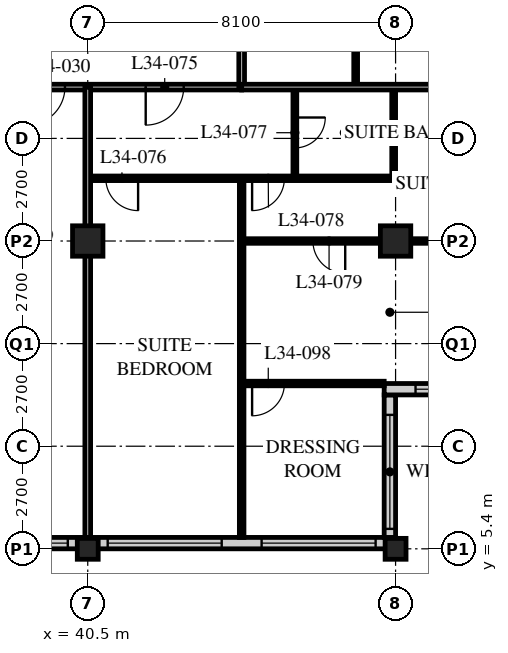
"""IFC4 building model, lengths in metres.
Left out: names, types, materials, properties, quantities, classifications, styles, units other than length and angle.
Written with IfcOpenShell. Run it as: python <this file> out.ifc"""

import sys

from ifc_helpers import new_model, si_unit, direction, frame, frame_2d, origin, origin_2d, place, context, subcontext, project, spatial, rectangle, hollow_rectangle, extrude, element, fill, save


model = new_model("IFC4")
c1 = context("Model", 3, precision=1e-05, world=origin(), true_north=direction((0.0, 1.0)))
c2 = subcontext(c1, "Body", "Model", "MODEL_VIEW")
j1 = project(units=[si_unit("LENGTHUNIT", "METRE"), si_unit("PLANEANGLEUNIT", "RADIAN")], contexts=[c1])
p1 = place(None, origin())
s1 = spatial("IfcSite", under=j1, at=p1, CompositionType="ELEMENT")
p2 = place(p1, origin())
s2 = spatial("IfcBuilding", under=s1, at=p2, CompositionType="ELEMENT")
p3 = place(p2, frame((0.0, 0.0, 134.0)))
s3 = spatial("IfcBuildingStorey", under=s2, at=p3, CompositionType="ELEMENT", Elevation=134.0)
p4 = place(p3, frame((40.5, 5.4, 0.0), z_axis=(0.0, 0.0, 1.0), x_axis=(1.0, 0.0, 0.0)))
e1 = element("IfcColumn", 1, at=p4, inside=s3, PredefinedType="COLUMN", context=c2, shape_type="SweptSolid", body=[
    extrude(hollow_rectangle(XDim=0.55, YDim=0.55, WallThickness=0.04, at=origin_2d()), origin(), (0.0, 0.0, 1.0), 3.4),
])
p5 = place(p3, frame((40.5, 13.5, 0.0), z_axis=(0.0, 0.0, 1.0), x_axis=(1.0, 0.0, 0.0)))
e2 = element("IfcColumn", 2, at=p5, inside=s3, PredefinedType="COLUMN", context=c2, shape_type="SweptSolid", body=[
    extrude(hollow_rectangle(XDim=0.8, YDim=0.8, WallThickness=0.08, at=origin_2d()), origin(), (0.0, 0.0, 1.0), 3.4),
])
p6 = place(p3, frame((48.6, 5.4, 0.0), z_axis=(0.0, 0.0, 1.0), x_axis=(1.0, 0.0, 0.0)))
e3 = element("IfcColumn", 3, at=p6, inside=s3, PredefinedType="COLUMN", context=c2, shape_type="SweptSolid", body=[
    extrude(hollow_rectangle(XDim=0.55, YDim=0.55, WallThickness=0.04, at=origin_2d()), origin(), (0.0, 0.0, 1.0), 3.4),
])
p7 = place(p3, frame((48.6, 13.5, 0.0), z_axis=(0.0, 0.0, 1.0), x_axis=(1.0, 0.0, 0.0)))
e4 = element("IfcColumn", 4, at=p7, inside=s3, PredefinedType="COLUMN", context=c2, shape_type="SweptSolid", body=[
    extrude(hollow_rectangle(XDim=0.8, YDim=0.8, WallThickness=0.08, at=origin_2d()), origin(), (0.0, 0.0, 1.0), 3.4),
])
p8 = place(p3, frame((8.4, 5.55, 0.0), z_axis=(0.0, 0.0, 1.0), x_axis=(1.0, 0.0, 0.0)))
e5 = element("IfcWall", 5, at=p8, inside=s3, PredefinedType="SOLIDWALL", context=c2, shape_type="SweptSolid", body=[
    extrude(rectangle(XDim=40.2, YDim=0.3, at=frame_2d((20.1, 0.0))), origin(), (0.0, 0.0, 1.0), 3.19),
])
p9 = place(p8, frame((0.225, 0.0, 0.9)))
e6 = element("IfcOpeningElement", 6, at=p9, cuts=e5, PredefinedType="OPENING", context=c2, shape_type="SweptSolid", body=[
    extrude(rectangle(XDim=3.0, YDim=2.0, at=frame_2d((1.5, 1.0))), frame((0.0, 0.16, 0.0), z_axis=(0.0, -1.0, 0.0), x_axis=(1.0, 0.0, 0.0)), (0.0, 0.0, 1.0), 0.32),
])
p10 = place(p8, frame((4.275, 0.0, 0.9)))
e7 = element("IfcOpeningElement", 7, at=p10, cuts=e5, PredefinedType="OPENING", context=c2, shape_type="SweptSolid", body=[
    extrude(rectangle(XDim=3.0, YDim=2.0, at=frame_2d((1.5, 1.0))), frame((0.0, 0.16, 0.0), z_axis=(0.0, -1.0, 0.0), x_axis=(1.0, 0.0, 0.0)), (0.0, 0.0, 1.0), 0.32),
])
p11 = place(p8, frame((8.325, 0.0, 0.9)))
e8 = element("IfcOpeningElement", 8, at=p11, cuts=e5, PredefinedType="OPENING", context=c2, shape_type="SweptSolid", body=[
    extrude(rectangle(XDim=3.0, YDim=2.0, at=frame_2d((1.5, 1.0))), frame((0.0, 0.16, 0.0), z_axis=(0.0, -1.0, 0.0), x_axis=(1.0, 0.0, 0.0)), (0.0, 0.0, 1.0), 0.32),
])
p12 = place(p8, frame((12.375, 0.0, 0.9)))
e9 = element("IfcOpeningElement", 9, at=p12, cuts=e5, PredefinedType="OPENING", context=c2, shape_type="SweptSolid", body=[
    extrude(rectangle(XDim=3.0, YDim=2.0, at=frame_2d((1.5, 1.0))), frame((0.0, 0.16, 0.0), z_axis=(0.0, -1.0, 0.0), x_axis=(1.0, 0.0, 0.0)), (0.0, 0.0, 1.0), 0.32),
])
p13 = place(p8, frame((16.425, 0.0, 0.9)))
e10 = element("IfcOpeningElement", 10, at=p13, cuts=e5, PredefinedType="OPENING", context=c2, shape_type="SweptSolid", body=[
    extrude(rectangle(XDim=3.0, YDim=2.0, at=frame_2d((1.5, 1.0))), frame((0.0, 0.16, 0.0), z_axis=(0.0, -1.0, 0.0), x_axis=(1.0, 0.0, 0.0)), (0.0, 0.0, 1.0), 0.32),
])
p14 = place(p8, frame((20.475, 0.0, 0.9)))
e11 = element("IfcOpeningElement", 11, at=p14, cuts=e5, PredefinedType="OPENING", context=c2, shape_type="SweptSolid", body=[
    extrude(rectangle(XDim=3.0, YDim=2.0, at=frame_2d((1.5, 1.0))), frame((0.0, 0.16, 0.0), z_axis=(0.0, -1.0, 0.0), x_axis=(1.0, 0.0, 0.0)), (0.0, 0.0, 1.0), 0.32),
])
p15 = place(p8, frame((24.525, 0.0, 0.9)))
e12 = element("IfcOpeningElement", 12, at=p15, cuts=e5, PredefinedType="OPENING", context=c2, shape_type="SweptSolid", body=[
    extrude(rectangle(XDim=3.0, YDim=2.0, at=frame_2d((1.5, 1.0))), frame((0.0, 0.16, 0.0), z_axis=(0.0, -1.0, 0.0), x_axis=(1.0, 0.0, 0.0)), (0.0, 0.0, 1.0), 0.32),
])
p16 = place(p8, frame((28.575, 0.0, 0.9)))
e13 = element("IfcOpeningElement", 13, at=p16, cuts=e5, PredefinedType="OPENING", context=c2, shape_type="SweptSolid", body=[
    extrude(rectangle(XDim=3.0, YDim=2.0, at=frame_2d((1.5, 1.0))), frame((0.0, 0.16, 0.0), z_axis=(0.0, -1.0, 0.0), x_axis=(1.0, 0.0, 0.0)), (0.0, 0.0, 1.0), 0.32),
])
p17 = place(p8, frame((32.625, 0.0, 0.9)))
e14 = element("IfcOpeningElement", 14, at=p17, cuts=e5, PredefinedType="OPENING", context=c2, shape_type="SweptSolid", body=[
    extrude(rectangle(XDim=3.0, YDim=2.0, at=frame_2d((1.5, 1.0))), frame((0.0, 0.16, 0.0), z_axis=(0.0, -1.0, 0.0), x_axis=(1.0, 0.0, 0.0)), (0.0, 0.0, 1.0), 0.32),
])
p18 = place(p8, frame((36.675, 0.0, 0.9)))
e15 = element("IfcOpeningElement", 15, at=p18, cuts=e5, PredefinedType="OPENING", context=c2, shape_type="SweptSolid", body=[
    extrude(rectangle(XDim=3.0, YDim=2.0, at=frame_2d((1.5, 1.0))), frame((0.0, 0.16, 0.0), z_axis=(0.0, -1.0, 0.0), x_axis=(1.0, 0.0, 0.0)), (0.0, 0.0, 1.0), 0.32),
])
p19 = place(p3, frame((48.45, 5.7, 0.0), z_axis=(0.0, 0.0, 1.0), x_axis=(0.0, 1.0, 0.0)))
e16 = element("IfcWall", 16, at=p19, inside=s3, PredefinedType="SOLIDWALL", context=c2, shape_type="SweptSolid", body=[
    extrude(rectangle(XDim=3.75, YDim=0.3, at=frame_2d((1.875, 0.0))), origin(), (0.0, 0.0, 1.0), 3.19),
])
p20 = place(p19, frame((0.225, 0.0, 0.9)))
e17 = element("IfcOpeningElement", 17, at=p20, cuts=e16, PredefinedType="OPENING", context=c2, shape_type="SweptSolid", body=[
    extrude(rectangle(XDim=3.0, YDim=1.5, at=frame_2d((1.5, 0.75))), frame((0.0, 0.16, 0.0), z_axis=(0.0, -1.0, 0.0), x_axis=(1.0, 0.0, 0.0)), (0.0, 0.0, 1.0), 0.32),
])
p21 = place(p3, frame((48.3, 9.6, 0.0), z_axis=(0.0, 0.0, 1.0), x_axis=(1.0, 0.0, 0.0)))
e18 = element("IfcWall", 18, at=p21, inside=s3, PredefinedType="SOLIDWALL", context=c2, shape_type="SweptSolid", body=[
    extrude(rectangle(XDim=4.35, YDim=0.3, at=frame_2d((2.175, 0.0))), origin(), (0.0, 0.0, 1.0), 3.19),
])
p22 = place(p21, frame((0.825, 0.0, 0.9)))
e19 = element("IfcOpeningElement", 19, at=p22, cuts=e18, PredefinedType="OPENING", context=c2, shape_type="SweptSolid", body=[
    extrude(rectangle(XDim=3.0, YDim=1.5, at=frame_2d((1.5, 0.75))), frame((0.0, 0.16, 0.0), z_axis=(0.0, -1.0, 0.0), x_axis=(1.0, 0.0, 0.0)), (0.0, 0.0, 1.0), 0.32),
])
p23 = place(p3, frame((8.1, 17.55, 0.0), z_axis=(0.0, 0.0, 1.0), x_axis=(1.0, 0.0, 0.0)))
e20 = element("IfcWall", 20, at=p23, inside=s3, PredefinedType="PARTITIONING", context=c2, shape_type="SweptSolid", body=[
    extrude(rectangle(XDim=36.45, YDim=0.15, at=frame_2d((18.225, 0.0))), origin(), (0.0, 0.0, 1.0), 3.19),
])
p24 = place(p23, frame((9.625, 0.0, 0.0)))
e21 = element("IfcOpeningElement", 21, at=p24, cuts=e20, PredefinedType="OPENING", context=c2, shape_type="SweptSolid", body=[
    extrude(rectangle(XDim=1.0, YDim=2.1, at=frame_2d((0.5, 1.05))), frame((0.0, 0.085, 0.0), z_axis=(0.0, -1.0, 0.0), x_axis=(1.0, 0.0, 0.0)), (0.0, 0.0, 1.0), 0.17),
])
p25 = place(p23, frame((18.1, 0.0, 0.0)))
e22 = element("IfcOpeningElement", 22, at=p25, cuts=e20, PredefinedType="OPENING", context=c2, shape_type="SweptSolid", body=[
    extrude(rectangle(XDim=1.0, YDim=2.1, at=frame_2d((0.5, 1.05))), frame((0.0, 0.085, 0.0), z_axis=(0.0, -1.0, 0.0), x_axis=(1.0, 0.0, 0.0)), (0.0, 0.0, 1.0), 0.17),
])
p26 = place(p23, frame((26.75, 0.0, 0.0)))
e23 = element("IfcOpeningElement", 23, at=p26, cuts=e20, PredefinedType="OPENING", context=c2, shape_type="SweptSolid", body=[
    extrude(rectangle(XDim=1.0, YDim=2.1, at=frame_2d((0.5, 1.05))), frame((0.0, 0.085, 0.0), z_axis=(0.0, -1.0, 0.0), x_axis=(1.0, 0.0, 0.0)), (0.0, 0.0, 1.0), 0.17),
])
p27 = place(p23, frame((30.8, 0.0, 0.0)))
e24 = element("IfcOpeningElement", 24, at=p27, cuts=e20, PredefinedType="OPENING", context=c2, shape_type="SweptSolid", body=[
    extrude(rectangle(XDim=1.0, YDim=2.1, at=frame_2d((0.5, 1.05))), frame((0.0, 0.085, 0.0), z_axis=(0.0, -1.0, 0.0), x_axis=(1.0, 0.0, 0.0)), (0.0, 0.0, 1.0), 0.17),
])
p28 = place(p23, frame((1.525, 0.0, 0.0)))
e25 = element("IfcOpeningElement", 25, at=p28, cuts=e20, PredefinedType="OPENING", context=c2, shape_type="SweptSolid", body=[
    extrude(rectangle(XDim=1.0, YDim=2.1, at=frame_2d((0.5, 1.05))), frame((0.0, 0.085, 0.0), z_axis=(0.0, -1.0, 0.0), x_axis=(1.0, 0.0, 0.0)), (0.0, 0.0, 1.0), 0.17),
])
p29 = place(p23, frame((33.925, 0.0, 0.0)))
e26 = element("IfcOpeningElement", 26, at=p29, cuts=e20, PredefinedType="OPENING", context=c2, shape_type="SweptSolid", body=[
    extrude(rectangle(XDim=1.0, YDim=2.1, at=frame_2d((0.5, 1.05))), frame((0.0, 0.085, 0.0), z_axis=(0.0, -1.0, 0.0), x_axis=(1.0, 0.0, 0.0)), (0.0, 0.0, 1.0), 0.17),
])
p30 = place(p3, frame((44.55, 17.55, 0.0), z_axis=(0.0, 0.0, 1.0), x_axis=(0.0, 1.0, 0.0)))
e27 = element("IfcWall", 27, at=p30, inside=s3, PredefinedType="PARTITIONING", context=c2, shape_type="SweptSolid", body=[
    extrude(rectangle(XDim=28.35, YDim=0.15, at=frame_2d((14.175, 0.0))), origin(), (0.0, 0.0, 1.0), 3.19),
])
p31 = place(p30, frame((2.75, 0.0, 0.0)))
e28 = element("IfcOpeningElement", 28, at=p31, cuts=e27, PredefinedType="OPENING", context=c2, shape_type="SweptSolid", body=[
    extrude(rectangle(XDim=1.0, YDim=2.1, at=frame_2d((0.5, 1.05))), frame((0.0, 0.085, 0.0), z_axis=(0.0, -1.0, 0.0), x_axis=(1.0, 0.0, 0.0)), (0.0, 0.0, 1.0), 0.17),
])
p32 = place(p30, frame((6.5, 0.0, 0.0)))
e29 = element("IfcOpeningElement", 29, at=p32, cuts=e27, PredefinedType="OPENING", context=c2, shape_type="SweptSolid", body=[
    extrude(rectangle(XDim=1.0, YDim=2.1, at=frame_2d((0.5, 1.05))), frame((0.0, 0.085, 0.0), z_axis=(0.0, -1.0, 0.0), x_axis=(1.0, 0.0, 0.0)), (0.0, 0.0, 1.0), 0.17),
])
p33 = place(p30, frame((13.55, 0.0, 0.0)))
e30 = element("IfcOpeningElement", 30, at=p33, cuts=e27, PredefinedType="OPENING", context=c2, shape_type="SweptSolid", body=[
    extrude(rectangle(XDim=1.0, YDim=2.1, at=frame_2d((0.5, 1.05))), frame((0.0, 0.085, 0.0), z_axis=(0.0, -1.0, 0.0), x_axis=(1.0, 0.0, 0.0)), (0.0, 0.0, 1.0), 0.17),
])
p34 = place(p30, frame((18.1, 0.0, 0.0)))
e31 = element("IfcOpeningElement", 31, at=p34, cuts=e27, PredefinedType="OPENING", context=c2, shape_type="SweptSolid", body=[
    extrude(rectangle(XDim=1.0, YDim=2.1, at=frame_2d((0.5, 1.05))), frame((0.0, 0.085, 0.0), z_axis=(0.0, -1.0, 0.0), x_axis=(1.0, 0.0, 0.0)), (0.0, 0.0, 1.0), 0.17),
])
p35 = place(p30, frame((26.75, 0.0, 0.0)))
e32 = element("IfcOpeningElement", 32, at=p35, cuts=e27, PredefinedType="OPENING", context=c2, shape_type="SweptSolid", body=[
    extrude(rectangle(XDim=1.0, YDim=2.1, at=frame_2d((0.5, 1.05))), frame((0.0, 0.085, 0.0), z_axis=(0.0, -1.0, 0.0), x_axis=(1.0, 0.0, 0.0)), (0.0, 0.0, 1.0), 0.17),
])
p36 = place(p3, frame((47.55, 17.55, 0.0), z_axis=(0.0, 0.0, 1.0), x_axis=(0.0, 1.0, 0.0)))
e33 = element("IfcWall", 33, at=p36, inside=s3, PredefinedType="PARTITIONING", context=c2, shape_type="SweptSolid", body=[
    extrude(rectangle(XDim=2.6, YDim=0.1, at=frame_2d((1.3, 0.0))), origin(), (0.0, 0.0, 1.0), 3.19),
])
p37 = place(p3, frame((40.5, 15.15, 0.0), z_axis=(0.0, 0.0, 1.0), x_axis=(1.0, 0.0, 0.0)))
e34 = element("IfcWall", 34, at=p37, inside=s3, PredefinedType="PARTITIONING", context=c2, shape_type="SweptSolid", body=[
    extrude(rectangle(XDim=8.05, YDim=0.12, at=frame_2d((4.025, 0.0))), origin(), (0.0, 0.0, 1.0), 3.19),
])
p38 = place(p37, frame((0.475, 0.0, 0.0)))
e35 = element("IfcOpeningElement", 35, at=p38, cuts=e34, PredefinedType="OPENING", context=c2, shape_type="SweptSolid", body=[
    extrude(rectangle(XDim=0.85, YDim=2.1, at=frame_2d((0.425, 1.05))), frame((0.0, 0.07, 0.0), z_axis=(0.0, -1.0, 0.0), x_axis=(1.0, 0.0, 0.0)), (0.0, 0.0, 1.0), 0.14),
])
p39 = place(p37, frame((4.325, 0.0, 0.0)))
e36 = element("IfcOpeningElement", 36, at=p39, cuts=e34, PredefinedType="OPENING", context=c2, shape_type="SweptSolid", body=[
    extrude(rectangle(XDim=0.85, YDim=2.1, at=frame_2d((0.425, 1.05))), frame((0.0, 0.07, 0.0), z_axis=(0.0, -1.0, 0.0), x_axis=(1.0, 0.0, 0.0)), (0.0, 0.0, 1.0), 0.14),
])
p40 = place(p3, frame((45.95, 17.55, 0.0), z_axis=(0.0, 0.0, 1.0), x_axis=(0.0, -1.0, 0.0)))
e37 = element("IfcWall", 37, at=p40, inside=s3, PredefinedType="PARTITIONING", context=c2, shape_type="SweptSolid", body=[
    extrude(rectangle(XDim=2.4, YDim=0.1, at=frame_2d((1.2, 0.0))), origin(), (0.0, 0.0, 1.0), 3.19),
])
p41 = place(p40, frame((0.8, 0.0, 0.0)))
e38 = element("IfcOpeningElement", 38, at=p41, cuts=e37, PredefinedType="OPENING", context=c2, shape_type="SweptSolid", body=[
    extrude(rectangle(XDim=0.8, YDim=2.1, at=frame_2d((0.4, 1.05))), frame((0.0, 0.06, 0.0), z_axis=(0.0, -1.0, 0.0), x_axis=(1.0, 0.0, 0.0)), (0.0, 0.0, 1.0), 0.12),
])
p42 = place(p3, frame((48.55, 17.55, 0.0), z_axis=(0.0, 0.0, 1.0), x_axis=(0.0, -1.0, 0.0)))
e39 = element("IfcWall", 39, at=p42, inside=s3, PredefinedType="PARTITIONING", context=c2, shape_type="SweptSolid", body=[
    extrude(rectangle(XDim=2.4, YDim=0.1, at=frame_2d((1.2, 0.0))), origin(), (0.0, 0.0, 1.0), 2.578),
])
p43 = place(p3, frame((44.55, 15.15, 0.0), z_axis=(0.0, 0.0, 1.0), x_axis=(0.0, -1.0, 0.0)))
e40 = element("IfcWall", 40, at=p43, inside=s3, PredefinedType="PARTITIONING", context=c2, shape_type="SweptSolid", body=[
    extrude(rectangle(XDim=9.45, YDim=0.12, at=frame_2d((4.725, 0.0))), origin(), (0.0, 0.0, 1.0), 3.19),
])
p44 = place(p3, frame((44.55, 13.5, 0.0), z_axis=(0.0, 0.0, 1.0), x_axis=(1.0, 0.0, 0.0)))
e41 = element("IfcWall", 41, at=p44, inside=s3, PredefinedType="PARTITIONING", context=c2, shape_type="SweptSolid", body=[
    extrude(rectangle(XDim=7.8, YDim=0.12, at=frame_2d((3.9, 0.0))), origin(), (0.0, 0.0, 1.0), 2.578),
])
p45 = place(p44, frame((1.875, 0.0, 0.0)))
e42 = element("IfcOpeningElement", 42, at=p45, cuts=e41, PredefinedType="OPENING", context=c2, shape_type="SweptSolid", body=[
    extrude(rectangle(XDim=0.85, YDim=2.1, at=frame_2d((0.425, 1.05))), frame((0.0, 0.07, 0.0), z_axis=(0.0, -1.0, 0.0), x_axis=(1.0, 0.0, 0.0)), (0.0, 0.0, 1.0), 0.14),
])
p46 = place(p3, frame((44.55, 17.55, 0.0), z_axis=(0.0, 0.0, 1.0), x_axis=(1.0, 0.0, 0.0)))
e43 = element("IfcWall", 43, at=p46, inside=s3, PredefinedType="PARTITIONING", context=c2, shape_type="SweptSolid", body=[
    extrude(rectangle(XDim=11.85, YDim=0.15, at=frame_2d((5.925, 0.0))), origin(), (0.0, 0.0, 1.0), 3.19),
])
p47 = place(p3, frame((40.5, 17.55, 0.0), z_axis=(0.0, 0.0, 1.0), x_axis=(0.0, -1.0, 0.0)))
e44 = element("IfcWall", 44, at=p47, inside=s3, PredefinedType="PARTITIONING", context=c2, shape_type="SweptSolid", body=[
    extrude(rectangle(XDim=11.85, YDim=0.15, at=frame_2d((5.925, 0.0))), origin(), (0.0, 0.0, 1.0), 2.578),
])
p48 = place(p3, frame((44.55, 9.75, 0.0), z_axis=(0.0, 0.0, 1.0), x_axis=(1.0, 0.0, 0.0)))
e45 = element("IfcWall", 45, at=p48, inside=s3, PredefinedType="PARTITIONING", context=c2, shape_type="SweptSolid", body=[
    extrude(rectangle(XDim=3.75, YDim=0.12, at=frame_2d((1.875, 0.0))), origin(), (0.0, 0.0, 1.0), 3.19),
])
p49 = place(p48, frame((0.275, 0.0, 0.0)))
e46 = element("IfcOpeningElement", 46, at=p49, cuts=e45, PredefinedType="OPENING", context=c2, shape_type="SweptSolid", body=[
    extrude(rectangle(XDim=0.85, YDim=2.1, at=frame_2d((0.425, 1.05))), frame((0.0, 0.07, 0.0), z_axis=(0.0, -1.0, 0.0), x_axis=(1.0, 0.0, 0.0)), (0.0, 0.0, 1.0), 0.14),
])
p50 = place(p16, origin())
e47 = element("IfcWindow", 47, at=p50, inside=s3, PartitioningType="SINGLE_PANEL", PredefinedType="WINDOW", context=c2, shape_type="SweptSolid", body=[
    extrude(rectangle(XDim=3.0, YDim=2.0, at=frame_2d((1.5, 1.0))), frame((0.0, 0.03, 0.0), z_axis=(0.0, -1.0, 0.0), x_axis=(1.0, 0.0, 0.0)), (0.0, 0.0, 1.0), 0.06),
])
fill(e13, e47)
p51 = place(p17, origin())
e48 = element("IfcWindow", 48, at=p51, inside=s3, PartitioningType="SINGLE_PANEL", PredefinedType="WINDOW", context=c2, shape_type="SweptSolid", body=[
    extrude(rectangle(XDim=3.0, YDim=2.0, at=frame_2d((1.5, 1.0))), frame((0.0, 0.03, 0.0), z_axis=(0.0, -1.0, 0.0), x_axis=(1.0, 0.0, 0.0)), (0.0, 0.0, 1.0), 0.06),
])
fill(e14, e48)
p52 = place(p18, origin())
e49 = element("IfcWindow", 49, at=p52, inside=s3, PartitioningType="SINGLE_PANEL", PredefinedType="WINDOW", context=c2, shape_type="SweptSolid", body=[
    extrude(rectangle(XDim=3.0, YDim=2.0, at=frame_2d((1.5, 1.0))), frame((0.0, 0.03, 0.0), z_axis=(0.0, -1.0, 0.0), x_axis=(1.0, 0.0, 0.0)), (0.0, 0.0, 1.0), 0.06),
])
fill(e15, e49)
p53 = place(p20, origin())
e50 = element("IfcWindow", 50, at=p53, inside=s3, PartitioningType="SINGLE_PANEL", PredefinedType="WINDOW", context=c2, shape_type="SweptSolid", body=[
    extrude(rectangle(XDim=3.0, YDim=1.5, at=frame_2d((1.5, 0.75))), frame((0.0, 0.03, 0.0), z_axis=(0.0, -1.0, 0.0), x_axis=(1.0, 0.0, 0.0)), (0.0, 0.0, 1.0), 0.06),
])
fill(e17, e50)
p54 = place(p22, origin())
e51 = element("IfcWindow", 51, at=p54, inside=s3, PartitioningType="SINGLE_PANEL", PredefinedType="WINDOW", context=c2, shape_type="SweptSolid", body=[
    extrude(rectangle(XDim=3.0, YDim=1.5, at=frame_2d((1.5, 0.75))), frame((0.0, 0.03, 0.0), z_axis=(0.0, -1.0, 0.0), x_axis=(1.0, 0.0, 0.0)), (0.0, 0.0, 1.0), 0.06),
])
fill(e19, e51)
p55 = place(p27, origin())
e52 = element("IfcDoor", 52, at=p55, inside=s3, OperationType="SINGLE_SWING_RIGHT", PredefinedType="DOOR", context=c2, shape_type="SweptSolid", body=[
    extrude(rectangle(XDim=1.0, YDim=2.1, at=frame_2d((0.5, 1.05))), frame((0.0, 0.025, 0.0), z_axis=(0.0, -1.0, 0.0), x_axis=(1.0, 0.0, 0.0)), (0.0, 0.0, 1.0), 0.05),
])
fill(e24, e52)
p56 = place(p29, origin())
e53 = element("IfcDoor", 53, at=p56, inside=s3, OperationType="SINGLE_SWING_RIGHT", PredefinedType="DOOR", context=c2, shape_type="SweptSolid", body=[
    extrude(rectangle(XDim=1.0, YDim=2.1, at=frame_2d((0.5, 1.05))), frame((0.0, 0.025, 0.0), z_axis=(0.0, -1.0, 0.0), x_axis=(1.0, 0.0, 0.0)), (0.0, 0.0, 1.0), 0.05),
])
fill(e26, e53)
p57 = place(p38, origin())
e54 = element("IfcDoor", 54, at=p57, inside=s3, OperationType="SINGLE_SWING_LEFT", PredefinedType="DOOR", context=c2, shape_type="SweptSolid", body=[
    extrude(rectangle(XDim=0.85, YDim=2.1, at=frame_2d((0.425, 1.05))), frame((0.0, 0.025, 0.0), z_axis=(0.0, -1.0, 0.0), x_axis=(1.0, 0.0, 0.0)), (0.0, 0.0, 1.0), 0.05),
])
fill(e35, e54)
p58 = place(p41, origin())
e55 = element("IfcDoor", 55, at=p58, inside=s3, OperationType="SINGLE_SWING_LEFT", PredefinedType="DOOR", context=c2, shape_type="SweptSolid", body=[
    extrude(rectangle(XDim=0.8, YDim=2.1, at=frame_2d((0.4, 1.05))), frame((0.0, 0.025, 0.0), z_axis=(0.0, -1.0, 0.0), x_axis=(1.0, 0.0, 0.0)), (0.0, 0.0, 1.0), 0.05),
])
fill(e38, e55)
p59 = place(p39, origin())
e56 = element("IfcDoor", 56, at=p59, inside=s3, OperationType="SINGLE_SWING_RIGHT", PredefinedType="DOOR", context=c2, shape_type="SweptSolid", body=[
    extrude(rectangle(XDim=0.85, YDim=2.1, at=frame_2d((0.425, 1.05))), frame((0.0, 0.025, 0.0), z_axis=(0.0, -1.0, 0.0), x_axis=(1.0, 0.0, 0.0)), (0.0, 0.0, 1.0), 0.05),
])
fill(e36, e56)
p60 = place(p45, origin())
e57 = element("IfcDoor", 57, at=p60, inside=s3, OperationType="SINGLE_SWING_LEFT", PredefinedType="DOOR", context=c2, shape_type="SweptSolid", body=[
    extrude(rectangle(XDim=0.85, YDim=2.1, at=frame_2d((0.425, 1.05))), frame((0.0, 0.025, 0.0), z_axis=(0.0, -1.0, 0.0), x_axis=(1.0, 0.0, 0.0)), (0.0, 0.0, 1.0), 0.05),
])
fill(e42, e57)
p61 = place(p49, origin())
e58 = element("IfcDoor", 58, at=p61, inside=s3, OperationType="SINGLE_SWING_RIGHT", PredefinedType="DOOR", context=c2, shape_type="SweptSolid", body=[
    extrude(rectangle(XDim=0.85, YDim=2.1, at=frame_2d((0.425, 1.05))), frame((0.0, 0.025, 0.0), z_axis=(0.0, -1.0, 0.0), x_axis=(1.0, 0.0, 0.0)), (0.0, 0.0, 1.0), 0.05),
])
fill(e46, e58)
save(model, sys.argv[1])
